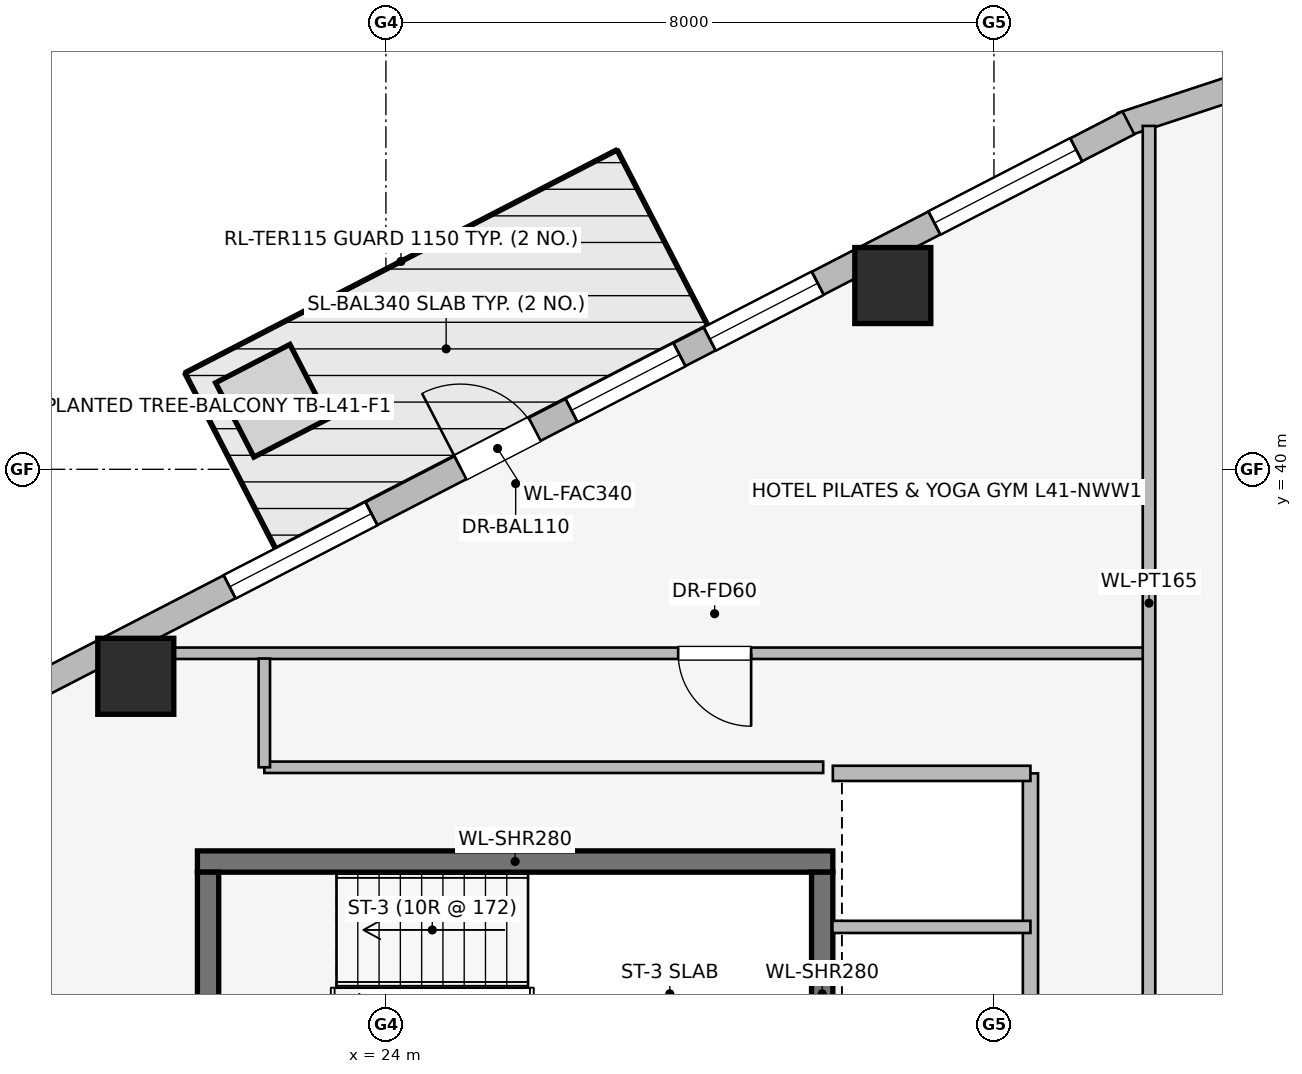
"""IFC4 building model, lengths in metres.
Left out: names, types, materials, properties, quantities, classifications, styles, units other than length and angle.
Written with IfcOpenShell. Run it as: python <this file> out.ifc"""

import sys

from ifc_helpers import new_model, si_unit, direction, frame, frame_2d, origin, origin_2d, place, context, subcontext, project, spatial, rectangle, extrude, element, fill, save


model = new_model("IFC4")
c1 = context("Model", 3, precision=1e-05, world=origin(), true_north=direction((0.0, 1.0)))
c2 = subcontext(c1, "Body", "Model", "MODEL_VIEW")
j1 = project(units=[si_unit("LENGTHUNIT", "METRE"), si_unit("PLANEANGLEUNIT", "RADIAN")], contexts=[c1])
p1 = place(None, origin())
s1 = spatial("IfcSite", under=j1, at=p1, CompositionType="ELEMENT")
p2 = place(p1, origin())
s2 = spatial("IfcBuilding", under=s1, at=p2, CompositionType="ELEMENT")
p3 = place(p2, frame((0.0, 0.0, 153.3)))
s3 = spatial("IfcBuildingStorey", under=s2, at=p3, CompositionType="ELEMENT", Elevation=153.3)
p4 = place(p3, frame((29.88, 34.84, 0.0), z_axis=(0.0, 0.0, 1.0), x_axis=(-1.0, 0.0, 0.0)))
e1 = element("IfcWall", 1, at=p4, inside=s3, PredefinedType="SHEAR", context=c2, shape_type="SweptSolid", body=[
    extrude(rectangle(XDim=8.36, YDim=0.28, at=frame_2d((4.18, 0.0))), origin(), (0.0, 0.0, 1.0), 3.45),
])
for number, where, z_axis, x_axis in (
    (2, (21.66, 34.7, 0.0), (0.0, 0.0, 1.0), (0.0, -1.0, 0.0)),
    (3, (29.74, 31.5, 0.0), (0.0, 0.0, 1.0), (0.0, 1.0, 0.0)),
):
    element("IfcWall", number, at=place(p3, frame(where, z_axis=z_axis, x_axis=x_axis)), inside=s3, PredefinedType="SHEAR", context=c2, shape_type="SweptSolid", body=[
        extrude(rectangle(XDim=3.2, YDim=0.28, at=frame_2d((1.6, 0.0))), origin(), (0.0, 0.0, 1.0), 3.45),
    ])
for number, where, z_axis, x_axis in (
    (4, (30.669, 42.418, 0.0), (0.0, 0.0, 1.0), (1.0, 0.0, 0.0)),
    (5, (20.709, 37.277, 0.0), (0.0, 0.0, 1.0), (1.0, 0.0, 0.0)),
):
    element("IfcColumn", number, at=place(p3, frame(where, z_axis=z_axis, x_axis=x_axis)), inside=s3, PredefinedType="COLUMN", context=c2, shape_type="SweptSolid", body=[
        extrude(rectangle(XDim=1.0, YDim=1.0, at=origin_2d()), origin(), (0.0, 0.0, 1.0), 3.45),
    ])
p5 = place(p3, frame((33.681, 44.532, 0.0), z_axis=(0.0, 0.0, 1.0), x_axis=(0.949937416267, 0.312440242569, 0.0)))
e6 = element("IfcWall", 6, at=p5, inside=s3, PredefinedType="STANDARD", context=c2, shape_type="SweptSolid", body=[
    extrude(rectangle(XDim=1.722, YDim=0.33, at=frame_2d((0.861, 0.0))), origin(), (0.0, 0.0, 1.0), 3.19),
])
p6 = place(p3, frame((17.169, 35.99, 0.0), z_axis=(0.0, 0.0, 1.0), x_axis=(0.888613612362, 0.458656568606, 0.0)))
e7 = element("IfcWall", 7, at=p6, inside=s3, PredefinedType="STANDARD", context=c2, shape_type="SweptSolid", body=[
    extrude(rectangle(XDim=18.681, YDim=0.34, at=frame_2d((9.34, 0.0))), origin(), (0.0, 0.0, 1.0), 3.19),
])
p7 = place(p6, frame((8.79, 0.0, 0.0)))
e8 = element("IfcOpeningElement", 8, at=p7, cuts=e7, PredefinedType="OPENING", context=c2, shape_type="SweptSolid", body=[
    extrude(rectangle(XDim=1.1, YDim=2.04, at=frame_2d((0.55, 1.02))), frame((0.0, 0.18, 0.0), z_axis=(0.0, -1.0, 0.0), x_axis=(1.0, 0.0, 0.0)), (0.0, 0.0, 1.0), 0.36),
])
p8 = place(p6, frame((1.023, 0.0, 0.75)))
e9 = element("IfcOpeningElement", 9, at=p8, cuts=e7, PredefinedType="OPENING", context=c2, shape_type="SweptSolid", body=[
    extrude(rectangle(XDim=1.6, YDim=1.55, at=frame_2d((0.8, 0.775))), frame((0.0, 0.18, 0.0), z_axis=(0.0, -1.0, 0.0), x_axis=(1.0, 0.0, 0.0)), (0.0, 0.0, 1.0), 0.36),
])
p9 = place(p6, frame((5.373, 0.0, 0.75)))
e10 = element("IfcOpeningElement", 10, at=p9, cuts=e7, PredefinedType="OPENING", context=c2, shape_type="SweptSolid", body=[
    extrude(rectangle(XDim=2.1, YDim=1.5, at=frame_2d((1.05, 0.75))), frame((0.0, 0.18, 0.0), z_axis=(0.0, -1.0, 0.0), x_axis=(1.0, 0.0, 0.0)), (0.0, 0.0, 1.0), 0.36),
])
p10 = place(p6, frame((10.434, 0.0, 0.75)))
e11 = element("IfcOpeningElement", 11, at=p10, cuts=e7, PredefinedType="OPENING", context=c2, shape_type="SweptSolid", body=[
    extrude(rectangle(XDim=1.6, YDim=1.55, at=frame_2d((0.8, 0.775))), frame((0.0, 0.18, 0.0), z_axis=(0.0, -1.0, 0.0), x_axis=(1.0, 0.0, 0.0)), (0.0, 0.0, 1.0), 0.36),
])
p11 = place(p6, frame((12.481, 0.0, 0.75)))
e12 = element("IfcOpeningElement", 12, at=p11, cuts=e7, PredefinedType="OPENING", context=c2, shape_type="SweptSolid", body=[
    extrude(rectangle(XDim=1.6, YDim=1.55, at=frame_2d((0.8, 0.775))), frame((0.0, 0.18, 0.0), z_axis=(0.0, -1.0, 0.0), x_axis=(1.0, 0.0, 0.0)), (0.0, 0.0, 1.0), 0.36),
])
p12 = place(p6, frame((15.808, 0.0, 0.75)))
e13 = element("IfcOpeningElement", 13, at=p12, cuts=e7, PredefinedType="OPENING", context=c2, shape_type="SweptSolid", body=[
    extrude(rectangle(XDim=2.1, YDim=1.5, at=frame_2d((1.05, 0.75))), frame((0.0, 0.18, 0.0), z_axis=(0.0, -1.0, 0.0), x_axis=(1.0, 0.0, 0.0)), (0.0, 0.0, 1.0), 0.36),
])
p13 = place(p3, frame((32.48, 31.95, 0.0), z_axis=(0.0, 0.0, 1.0), x_axis=(0.0, 1.0, 0.0)))
e14 = element("IfcWall", 14, at=p13, inside=s3, PredefinedType="PARTITIONING", context=c2, shape_type="SweptSolid", body=[
    extrude(rectangle(XDim=4.05, YDim=0.2, at=frame_2d((2.025, 0.0))), origin(), (0.0, 0.0, 1.0), 3.19),
])
p14 = place(p3, frame((29.88, 36.0, 0.0), z_axis=(0.0, 0.0, 1.0), x_axis=(1.0, 0.0, 0.0)))
e15 = element("IfcWall", 15, at=p14, inside=s3, PredefinedType="PARTITIONING", context=c2, shape_type="SweptSolid", body=[
    extrude(rectangle(XDim=2.6, YDim=0.2, at=frame_2d((1.3, 0.0))), origin(), (0.0, 0.0, 1.0), 3.19),
])
p15 = place(p3, frame((29.875, 33.98, 0.0), z_axis=(0.0, 0.0, 1.0), x_axis=(1.0, 0.0, 0.0)))
e16 = element("IfcWall", 16, at=p15, inside=s3, PredefinedType="PARTITIONING", context=c2, shape_type="SweptSolid", body=[
    extrude(rectangle(XDim=2.605, YDim=0.16, at=frame_2d((1.302, 0.0))), origin(), (0.0, 0.0, 1.0), 3.19),
])
p16 = place(p3, frame((34.0, 37.58, 0.0), z_axis=(0.0, 0.0, 1.0), x_axis=(-1.0, 0.0, 0.0)))
e17 = element("IfcWall", 17, at=p16, inside=s3, PredefinedType="PARTITIONING", context=c2, shape_type="SweptSolid", body=[
    extrude(rectangle(XDim=13.707, YDim=0.15, at=frame_2d((6.854, 0.0))), origin(), (0.0, 0.0, 1.0), 2.582),
])
p17 = place(p16, frame((5.195, 0.0, 0.0)))
e18 = element("IfcOpeningElement", 18, at=p17, cuts=e17, PredefinedType="OPENING", context=c2, shape_type="SweptSolid", body=[
    extrude(rectangle(XDim=0.96, YDim=2.0, at=frame_2d((0.48, 1.0))), frame((0.0, 0.085, 0.0), z_axis=(0.0, -1.0, 0.0), x_axis=(1.0, 0.0, 0.0)), (0.0, 0.0, 1.0), 0.17),
])
p18 = place(p3, frame((34.04, 31.96, 0.0), z_axis=(0.0, 0.0, 1.0), x_axis=(0.0, 1.0, 0.0)))
e19 = element("IfcWall", 19, at=p18, inside=s3, PredefinedType="PARTITIONING", context=c2, shape_type="SweptSolid", body=[
    extrude(rectangle(XDim=12.558, YDim=0.165, at=frame_2d((6.279, 0.0))), origin(), (0.0, 0.0, 1.0), 3.19),
])
p19 = place(p3, frame((29.753, 36.08, 0.0), z_axis=(0.0, 0.0, 1.0), x_axis=(-1.0, 0.0, 0.0)))
e20 = element("IfcWall", 20, at=p19, inside=s3, PredefinedType="PARTITIONING", context=c2, shape_type="SweptSolid", body=[
    extrude(rectangle(XDim=7.353, YDim=0.15, at=frame_2d((3.677, 0.0))), origin(), (0.0, 0.0, 1.0), 2.582),
])
p20 = place(p3, frame((22.4, 36.08, 0.0), z_axis=(0.0, 0.0, 1.0), x_axis=(0.0, 1.0, 0.0)))
e21 = element("IfcWall", 21, at=p20, inside=s3, PredefinedType="PARTITIONING", context=c2, shape_type="SweptSolid", body=[
    extrude(rectangle(XDim=1.43, YDim=0.15, at=frame_2d((0.715, 0.0))), origin(), (0.0, 0.0, 1.0), 3.19),
])
p21 = place(p7, origin())
e22 = element("IfcDoor", 22, at=p21, inside=s3, OperationType="SINGLE_SWING_LEFT", PredefinedType="DOOR", context=c2, shape_type="SweptSolid", body=[
    extrude(rectangle(XDim=1.1, YDim=2.04, at=frame_2d((0.55, 1.02))), frame((0.0, 0.025, 0.0), z_axis=(0.0, -1.0, 0.0), x_axis=(1.0, 0.0, 0.0)), (0.0, 0.0, 1.0), 0.05),
])
fill(e8, e22)
p22 = place(p9, origin())
e23 = element("IfcWindow", 23, at=p22, inside=s3, PartitioningType="SINGLE_PANEL", PredefinedType="WINDOW", context=c2, shape_type="SweptSolid", body=[
    extrude(rectangle(XDim=2.1, YDim=1.5, at=frame_2d((1.05, 0.75))), frame((0.0, 0.03, 0.0), z_axis=(0.0, -1.0, 0.0), x_axis=(1.0, 0.0, 0.0)), (0.0, 0.0, 1.0), 0.06),
])
fill(e10, e23)
p23 = place(p10, origin())
e24 = element("IfcWindow", 24, at=p23, inside=s3, PartitioningType="SINGLE_PANEL", PredefinedType="WINDOW", context=c2, shape_type="SweptSolid", body=[
    extrude(rectangle(XDim=1.6, YDim=1.55, at=frame_2d((0.8, 0.775))), frame((0.0, 0.03, 0.0), z_axis=(0.0, -1.0, 0.0), x_axis=(1.0, 0.0, 0.0)), (0.0, 0.0, 1.0), 0.06),
])
fill(e11, e24)
p24 = place(p11, origin())
e25 = element("IfcWindow", 25, at=p24, inside=s3, PartitioningType="SINGLE_PANEL", PredefinedType="WINDOW", context=c2, shape_type="SweptSolid", body=[
    extrude(rectangle(XDim=1.6, YDim=1.55, at=frame_2d((0.8, 0.775))), frame((0.0, 0.03, 0.0), z_axis=(0.0, -1.0, 0.0), x_axis=(1.0, 0.0, 0.0)), (0.0, 0.0, 1.0), 0.06),
])
fill(e12, e25)
p25 = place(p12, origin())
e26 = element("IfcWindow", 26, at=p25, inside=s3, PartitioningType="SINGLE_PANEL", PredefinedType="WINDOW", context=c2, shape_type="SweptSolid", body=[
    extrude(rectangle(XDim=2.1, YDim=1.5, at=frame_2d((1.05, 0.75))), frame((0.0, 0.03, 0.0), z_axis=(0.0, -1.0, 0.0), x_axis=(1.0, 0.0, 0.0)), (0.0, 0.0, 1.0), 0.06),
])
fill(e13, e26)
p26 = place(p17, origin())
e27 = element("IfcDoor", 27, at=p26, inside=s3, OperationType="SINGLE_SWING_LEFT", PredefinedType="DOOR", context=c2, shape_type="SweptSolid", body=[
    extrude(rectangle(XDim=0.96, YDim=2.0, at=frame_2d((0.48, 1.0))), frame((0.0, 0.025, 0.0), z_axis=(0.0, -1.0, 0.0), x_axis=(1.0, 0.0, 0.0)), (0.0, 0.0, 1.0), 0.05),
])
fill(e18, e27)
save(model, sys.argv[1])
